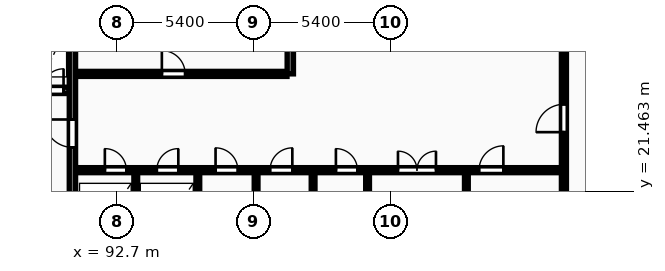
"""IFC4 building model, lengths in metres.
Left out: names, types, materials, properties, quantities, classifications, styles, units other than length and angle.
Written with IfcOpenShell. Run it as: python <this file> out.ifc"""

import sys

from ifc_helpers import new_model, si_unit, direction, frame, frame_2d, origin, place, context, subcontext, project, spatial, rectangle, extrude, element, fill, save


model = new_model("IFC4")
c1 = context("Model", 3, precision=1e-05, world=origin(), true_north=direction((0.0, 1.0)))
c2 = subcontext(c1, "Body", "Model", "MODEL_VIEW")
j1 = project(units=[si_unit("LENGTHUNIT", "METRE"), si_unit("PLANEANGLEUNIT", "RADIAN")], contexts=[c1])
p1 = place(None, origin())
s1 = spatial("IfcSite", under=j1, at=p1, CompositionType="ELEMENT")
p2 = place(p1, origin())
s2 = spatial("IfcBuilding", under=s1, at=p2, CompositionType="ELEMENT")
p3 = place(p2, frame((0.0, 0.0, 126.3)))
s3 = spatial("IfcBuildingStorey", under=s2, at=p3, CompositionType="ELEMENT", Elevation=126.3)
p4 = place(p3, frame((86.5, 25.45, 0.0), z_axis=(0.0, 0.0, 1.0), x_axis=(1.0, 0.0, 0.0)))
e1 = element("IfcWall", 1, at=p4, inside=s3, PredefinedType="SHEAR", context=c2, shape_type="SweptSolid", body=[
    extrude(rectangle(XDim=4.32, YDim=0.25, at=frame_2d((2.16, 0.0))), origin(), (0.0, 0.0, 1.0), 3.25),
])
p5 = place(p4, frame((1.14, 0.0, 0.0)))
e2 = element("IfcOpeningElement", 2, at=p5, cuts=e1, PredefinedType="OPENING", context=c2, shape_type="SweptSolid", body=[
    extrude(rectangle(XDim=1.12, YDim=2.12, at=frame_2d((0.56, 1.06))), frame((0.0, 0.135, 0.0), z_axis=(0.0, -1.0, 0.0), x_axis=(1.0, 0.0, 0.0)), (0.0, 0.0, 1.0), 0.27),
])
p6 = place(p4, frame((3.25, 0.0, 0.0)))
e3 = element("IfcOpeningElement", 3, at=p6, cuts=e1, PredefinedType="OPENING", context=c2, shape_type="SweptSolid", body=[
    extrude(rectangle(XDim=0.85, YDim=2.05, at=frame_2d((0.425, 1.025))), frame((0.0, 0.135, 0.0), z_axis=(0.0, -1.0, 0.0), x_axis=(1.0, 0.0, 0.0)), (0.0, 0.0, 1.0), 0.27),
])
p7 = place(p3, frame((90.95, 18.6, 0.0), z_axis=(0.0, 0.0, 1.0), x_axis=(0.0, 1.0, 0.0)))
e4 = element("IfcWall", 4, at=p7, inside=s3, PredefinedType="SHEAR", context=c2, shape_type="SweptSolid", body=[
    extrude(rectangle(XDim=11.6, YDim=0.25, at=frame_2d((5.8, 0.0))), origin(), (0.0, 0.0, 1.0), 3.25),
])
p8 = place(p7, frame((4.6, 0.0, 0.0)))
e5 = element("IfcOpeningElement", 5, at=p8, cuts=e4, PredefinedType="OPENING", context=c2, shape_type="SweptSolid", body=[
    extrude(rectangle(XDim=1.1, YDim=2.1, at=frame_2d((0.55, 1.05))), frame((0.0, 0.135, 0.0), z_axis=(0.0, -1.0, 0.0), x_axis=(1.0, 0.0, 0.0)), (0.0, 0.0, 1.0), 0.27),
])
p9 = place(p3, frame((91.08, 26.1, 0.0), z_axis=(0.0, 0.0, 1.0), x_axis=(1.0, 0.0, 0.0)))
e6 = element("IfcWall", 6, at=p9, inside=s3, PredefinedType="PARTITIONING", context=c2, shape_type="SweptSolid", body=[
    extrude(rectangle(XDim=8.34, YDim=0.2, at=frame_2d((4.17, 0.0))), origin(), (0.0, 0.0, 1.0), 2.97),
])
p10 = place(p9, frame((3.4, 0.0, 0.0)))
e7 = element("IfcOpeningElement", 7, at=p10, cuts=e6, PredefinedType="OPENING", context=c2, shape_type="SweptSolid", body=[
    extrude(rectangle(XDim=0.92, YDim=2.08, at=frame_2d((0.46, 1.04))), frame((0.0, 0.11, 0.0), z_axis=(0.0, -1.0, 0.0), x_axis=(1.0, 0.0, 0.0)), (0.0, 0.0, 1.0), 0.22),
])
p11 = place(p3, frame((99.55, 26.1, 0.0), z_axis=(0.0, 0.0, 1.0), x_axis=(0.0, 1.0, 0.0)))
e8 = element("IfcWall", 8, at=p11, inside=s3, PredefinedType="SHEAR", context=c2, shape_type="SweptSolid", body=[
    extrude(rectangle(XDim=4.1, YDim=0.25, at=frame_2d((2.05, 0.0))), origin(), (0.0, 0.0, 1.0), 3.25),
])
for number, where, z_axis, x_axis in (
    (9, (93.45, 18.6, 0.0), (0.0, 0.0, 1.0), (0.0, 1.0, 0.0)),
    (10, (95.9, 18.6, 0.0), (0.0, 0.0, 1.0), (0.0, 1.0, 0.0)),
    (11, (98.2, 18.6, 0.0), (0.0, 0.0, 1.0), (0.0, 1.0, 0.0)),
    (12, (100.45, 18.6, 0.0), (0.0, 0.0, 1.0), (0.0, 1.0, 0.0)),
    (13, (102.6, 18.6, 0.0), (0.0, 0.0, 1.0), (0.0, 1.0, 0.0)),
    (14, (106.5, 18.6, 0.0), (0.0, 0.0, 1.0), (0.0, 1.0, 0.0)),
):
    element("IfcWall", number, at=place(p3, frame(where, z_axis=z_axis, x_axis=x_axis)), inside=s3, PredefinedType="PARTITIONING", context=c2, shape_type="SweptSolid", body=[
        extrude(rectangle(XDim=3.6, YDim=0.15, at=frame_2d((1.8, 0.0))), origin(), (0.0, 0.0, 1.0), 2.97),
    ])
p12 = place(p3, frame((91.08, 22.3, 0.0), z_axis=(0.0, 0.0, 1.0), x_axis=(1.0, 0.0, 0.0)))
e15 = element("IfcWall", 15, at=p12, inside=s3, PredefinedType="PARTITIONING", context=c2, shape_type="SweptSolid", body=[
    extrude(rectangle(XDim=19.14, YDim=0.2, at=frame_2d((9.57, 0.0))), origin(), (0.0, 0.0, 1.0), 2.97),
])
p13 = place(p12, frame((1.15, 0.0, 0.0)))
e16 = element("IfcOpeningElement", 16, at=p13, cuts=e15, PredefinedType="OPENING", context=c2, shape_type="SweptSolid", body=[
    extrude(rectangle(XDim=0.85, YDim=2.05, at=frame_2d((0.425, 1.025))), frame((0.0, 0.11, 0.0), z_axis=(0.0, -1.0, 0.0), x_axis=(1.0, 0.0, 0.0)), (0.0, 0.0, 1.0), 0.22),
])
p14 = place(p12, frame((3.2, 0.0, 0.0)))
e17 = element("IfcOpeningElement", 17, at=p14, cuts=e15, PredefinedType="OPENING", context=c2, shape_type="SweptSolid", body=[
    extrude(rectangle(XDim=0.85, YDim=2.05, at=frame_2d((0.425, 1.025))), frame((0.0, 0.11, 0.0), z_axis=(0.0, -1.0, 0.0), x_axis=(1.0, 0.0, 0.0)), (0.0, 0.0, 1.0), 0.22),
])
p15 = place(p12, frame((12.72, 0.0, 0.0)))
e18 = element("IfcOpeningElement", 18, at=p15, cuts=e15, PredefinedType="OPENING", context=c2, shape_type="SweptSolid", body=[
    extrude(rectangle(XDim=1.5, YDim=2.2, at=frame_2d((0.75, 1.1))), frame((0.0, 0.11, 0.0), z_axis=(0.0, -1.0, 0.0), x_axis=(1.0, 0.0, 0.0)), (0.0, 0.0, 1.0), 0.22),
])
p16 = place(p12, frame((5.52, 0.0, 0.0)))
e19 = element("IfcOpeningElement", 19, at=p16, cuts=e15, PredefinedType="OPENING", context=c2, shape_type="SweptSolid", body=[
    extrude(rectangle(XDim=0.88, YDim=2.06, at=frame_2d((0.44, 1.03))), frame((0.0, 0.11, 0.0), z_axis=(0.0, -1.0, 0.0), x_axis=(1.0, 0.0, 0.0)), (0.0, 0.0, 1.0), 0.22),
])
p17 = place(p12, frame((7.67, 0.0, 0.0)))
e20 = element("IfcOpeningElement", 20, at=p17, cuts=e15, PredefinedType="OPENING", context=c2, shape_type="SweptSolid", body=[
    extrude(rectangle(XDim=0.88, YDim=2.06, at=frame_2d((0.44, 1.03))), frame((0.0, 0.11, 0.0), z_axis=(0.0, -1.0, 0.0), x_axis=(1.0, 0.0, 0.0)), (0.0, 0.0, 1.0), 0.22),
])
p18 = place(p12, frame((10.27, 0.0, 0.0)))
e21 = element("IfcOpeningElement", 21, at=p18, cuts=e15, PredefinedType="OPENING", context=c2, shape_type="SweptSolid", body=[
    extrude(rectangle(XDim=0.85, YDim=2.05, at=frame_2d((0.425, 1.025))), frame((0.0, 0.11, 0.0), z_axis=(0.0, -1.0, 0.0), x_axis=(1.0, 0.0, 0.0)), (0.0, 0.0, 1.0), 0.22),
])
p19 = place(p12, frame((15.92, 0.0, 0.0)))
e22 = element("IfcOpeningElement", 22, at=p19, cuts=e15, PredefinedType="OPENING", context=c2, shape_type="SweptSolid", body=[
    extrude(rectangle(XDim=0.96, YDim=2.1, at=frame_2d((0.48, 1.05))), frame((0.0, 0.11, 0.0), z_axis=(0.0, -1.0, 0.0), x_axis=(1.0, 0.0, 0.0)), (0.0, 0.0, 1.0), 0.22),
])
p20 = place(p3, frame((110.35, 18.6, 0.0), z_axis=(0.0, 0.0, 1.0), x_axis=(0.0, 1.0, 0.0)))
e23 = element("IfcWall", 23, at=p20, inside=s3, PredefinedType="PARTITIONING", context=c2, shape_type="SweptSolid", body=[
    extrude(rectangle(XDim=11.6, YDim=0.2, at=frame_2d((5.8, 0.0))), origin(), (0.0, 0.0, 1.0), 2.97),
])
p21 = place(p20, frame((5.2, 0.0, 0.0)))
e24 = element("IfcOpeningElement", 24, at=p21, cuts=e23, PredefinedType="OPENING", context=c2, shape_type="SweptSolid", body=[
    extrude(rectangle(XDim=1.1, YDim=2.15, at=frame_2d((0.55, 1.075))), frame((0.0, 0.11, 0.0), z_axis=(0.0, -1.0, 0.0), x_axis=(1.0, 0.0, 0.0)), (0.0, 0.0, 1.0), 0.22),
])
p22 = place(p6, origin())
e25 = element("IfcDoor", 25, at=p22, inside=s3, OperationType="SINGLE_SWING_RIGHT", PredefinedType="DOOR", context=c2, shape_type="SweptSolid", body=[
    extrude(rectangle(XDim=0.85, YDim=2.05, at=frame_2d((0.425, 1.025))), frame((0.0, 0.025, 0.0), z_axis=(0.0, -1.0, 0.0), x_axis=(1.0, 0.0, 0.0)), (0.0, 0.0, 1.0), 0.05),
])
fill(e3, e25)
p23 = place(p8, origin())
e26 = element("IfcDoor", 26, at=p23, inside=s3, OperationType="SINGLE_SWING_RIGHT", PredefinedType="DOOR", context=c2, shape_type="SweptSolid", body=[
    extrude(rectangle(XDim=1.1, YDim=2.1, at=frame_2d((0.55, 1.05))), frame((0.0, 0.025, 0.0), z_axis=(0.0, -1.0, 0.0), x_axis=(1.0, 0.0, 0.0)), (0.0, 0.0, 1.0), 0.05),
])
fill(e5, e26)
p24 = place(p10, origin())
e27 = element("IfcDoor", 27, at=p24, inside=s3, OperationType="SINGLE_SWING_LEFT", PredefinedType="DOOR", context=c2, shape_type="SweptSolid", body=[
    extrude(rectangle(XDim=0.92, YDim=2.08, at=frame_2d((0.46, 1.04))), frame((0.0, 0.025, 0.0), z_axis=(0.0, -1.0, 0.0), x_axis=(1.0, 0.0, 0.0)), (0.0, 0.0, 1.0), 0.05),
])
fill(e7, e27)
p25 = place(p13, origin())
e28 = element("IfcDoor", 28, at=p25, inside=s3, OperationType="SINGLE_SWING_LEFT", PredefinedType="DOOR", context=c2, shape_type="SweptSolid", body=[
    extrude(rectangle(XDim=0.85, YDim=2.05, at=frame_2d((0.425, 1.025))), frame((0.0, 0.025, 0.0), z_axis=(0.0, -1.0, 0.0), x_axis=(1.0, 0.0, 0.0)), (0.0, 0.0, 1.0), 0.05),
])
fill(e16, e28)
p26 = place(p14, origin())
e29 = element("IfcDoor", 29, at=p26, inside=s3, OperationType="SINGLE_SWING_RIGHT", PredefinedType="DOOR", context=c2, shape_type="SweptSolid", body=[
    extrude(rectangle(XDim=0.85, YDim=2.05, at=frame_2d((0.425, 1.025))), frame((0.0, 0.025, 0.0), z_axis=(0.0, -1.0, 0.0), x_axis=(1.0, 0.0, 0.0)), (0.0, 0.0, 1.0), 0.05),
])
fill(e17, e29)
p27 = place(p15, origin())
e30 = element("IfcDoor", 30, at=p27, inside=s3, OperationType="DOUBLE_DOOR_SINGLE_SWING", PredefinedType="DOOR", context=c2, shape_type="SweptSolid", body=[
    extrude(rectangle(XDim=1.5, YDim=2.2, at=frame_2d((0.75, 1.1))), frame((0.0, 0.025, 0.0), z_axis=(0.0, -1.0, 0.0), x_axis=(1.0, 0.0, 0.0)), (0.0, 0.0, 1.0), 0.05),
])
fill(e18, e30)
p28 = place(p16, origin())
e31 = element("IfcDoor", 31, at=p28, inside=s3, OperationType="SINGLE_SWING_LEFT", PredefinedType="DOOR", context=c2, shape_type="SweptSolid", body=[
    extrude(rectangle(XDim=0.88, YDim=2.06, at=frame_2d((0.44, 1.03))), frame((0.0, 0.025, 0.0), z_axis=(0.0, -1.0, 0.0), x_axis=(1.0, 0.0, 0.0)), (0.0, 0.0, 1.0), 0.05),
])
fill(e19, e31)
p29 = place(p17, origin())
e32 = element("IfcDoor", 32, at=p29, inside=s3, OperationType="SINGLE_SWING_RIGHT", PredefinedType="DOOR", context=c2, shape_type="SweptSolid", body=[
    extrude(rectangle(XDim=0.88, YDim=2.06, at=frame_2d((0.44, 1.03))), frame((0.0, 0.025, 0.0), z_axis=(0.0, -1.0, 0.0), x_axis=(1.0, 0.0, 0.0)), (0.0, 0.0, 1.0), 0.05),
])
fill(e20, e32)
p30 = place(p18, origin())
e33 = element("IfcDoor", 33, at=p30, inside=s3, OperationType="SINGLE_SWING_LEFT", PredefinedType="DOOR", context=c2, shape_type="SweptSolid", body=[
    extrude(rectangle(XDim=0.85, YDim=2.05, at=frame_2d((0.425, 1.025))), frame((0.0, 0.025, 0.0), z_axis=(0.0, -1.0, 0.0), x_axis=(1.0, 0.0, 0.0)), (0.0, 0.0, 1.0), 0.05),
])
fill(e21, e33)
p31 = place(p19, origin())
e34 = element("IfcDoor", 34, at=p31, inside=s3, OperationType="SINGLE_SWING_RIGHT", PredefinedType="DOOR", context=c2, shape_type="SweptSolid", body=[
    extrude(rectangle(XDim=0.96, YDim=2.1, at=frame_2d((0.48, 1.05))), frame((0.0, 0.025, 0.0), z_axis=(0.0, -1.0, 0.0), x_axis=(1.0, 0.0, 0.0)), (0.0, 0.0, 1.0), 0.05),
])
fill(e22, e34)
p32 = place(p21, origin())
e35 = element("IfcDoor", 35, at=p32, inside=s3, OperationType="SINGLE_SWING_LEFT", PredefinedType="DOOR", context=c2, shape_type="SweptSolid", body=[
    extrude(rectangle(XDim=1.1, YDim=2.15, at=frame_2d((0.55, 1.075))), frame((0.0, 0.025, 0.0), z_axis=(0.0, -1.0, 0.0), x_axis=(1.0, 0.0, 0.0)), (0.0, 0.0, 1.0), 0.05),
])
fill(e24, e35)
save(model, sys.argv[1])
